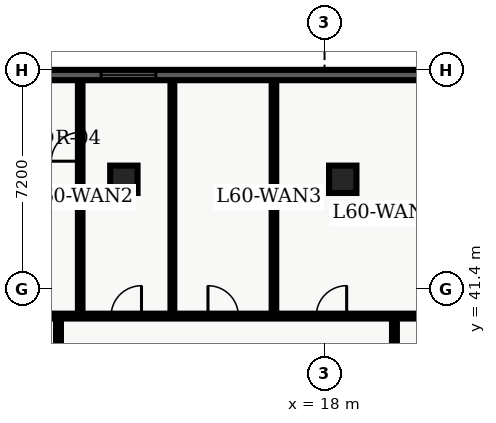
"""IFC4 building model, lengths in metres.
Left out: names, types, materials, properties, quantities, classifications, styles, units other than length and angle.
Written with IfcOpenShell. Run it as: python <this file> out.ifc"""

import sys

from ifc_helpers import new_model, entity, si_unit, converted_unit, direction, frame, origin_with_axes, origin_2d_with_axis, place, context, subcontext, project, spatial, polyline, rectangle, outline, extrude, element, fill, save


model = new_model("IFC4")
c1 = context("Model", 3, precision=1e-05, world=origin_with_axes(), true_north=direction((0.0, 1.0)))
c2 = subcontext(c1, "Body", "Model", "MODEL_VIEW")
j1 = project(units=[si_unit("LENGTHUNIT", "METRE"), converted_unit("PLANEANGLEUNIT", "DEGREE", entity("IfcPlaneAngleMeasure", 0.017), si_unit("PLANEANGLEUNIT", "RADIAN"), dimensions=[0, 0, 0, 0, 0, 0, 0])], contexts=[c1])
p1 = place(None, origin_with_axes())
s1 = spatial("IfcSite", under=j1, at=p1, CompositionType="ELEMENT")
p2 = place(p1, origin_with_axes())
s2 = spatial("IfcBuilding", under=s1, at=p2, CompositionType="ELEMENT")
p3 = place(p2, frame((0.0, 0.0, 244.2), z_axis=(0.0, 0.0, 1.0), x_axis=(1.0, 0.0, 0.0)))
s3 = spatial("IfcBuildingStorey", under=s2, at=p3, CompositionType="ELEMENT", Elevation=244.2)
for number, where, z_axis, x_axis in (
    (1, (11.4, 45.0, 0.0), (0.0, 0.0, 1.0), (1.0, 0.0, 0.0)),
    (2, (18.6, 45.0, 0.0), (0.0, 0.0, 1.0), (1.0, 0.0, 0.0)),
):
    element("IfcColumn", number, at=place(p3, frame(where, z_axis=z_axis, x_axis=x_axis)), inside=s3, PredefinedType="COLUMN", context=c2, shape_type="SweptSolid", body=[
        extrude(rectangle(XDim=0.9, YDim=0.9, at=origin_2d_with_axis()), origin_with_axes(), (0.0, 0.0, 1.0), 3.9),
    ])
p4 = place(p3, frame((7.1, 40.5, 0.0), z_axis=(0.0, 0.0, 1.0), x_axis=(1.0, 0.0, 0.0)))
e3 = element("IfcWall", 3, at=p4, inside=s3, PredefinedType="PARTITIONING", context=c2, shape_type="SweptSolid", body=[
    extrude(outline(polyline([(0.0, -0.08), (24.965, -0.08), (24.965, 0.08), (0.0, 0.08), (0.0, -0.08)])), origin_with_axes(), (0.0, 0.0, 1.0), 2.64),
])
p5 = place(p4, frame((4.38, 0.0, 0.0), z_axis=(0.0, 0.0, 1.0), x_axis=(1.0, 0.0, 0.0)))
e4 = element("IfcOpeningElement", 4, at=p5, cuts=e3, PredefinedType="OPENING", context=c2, shape_type="SweptSolid", body=[
    extrude(rectangle(XDim=1.0, YDim=0.18, at=origin_2d_with_axis()), origin_with_axes(), (0.0, 0.0, 1.0), 2.15),
])
p6 = place(p4, frame((7.566, 0.0, 0.0), z_axis=(0.0, 0.0, 1.0), x_axis=(1.0, 0.0, 0.0)))
e5 = element("IfcOpeningElement", 5, at=p6, cuts=e3, PredefinedType="OPENING", context=c2, shape_type="SweptSolid", body=[
    extrude(rectangle(XDim=1.0, YDim=0.18, at=origin_2d_with_axis()), origin_with_axes(), (0.0, 0.0, 1.0), 2.15),
])
p7 = place(p4, frame((11.129, 0.0, 0.0), z_axis=(0.0, 0.0, 1.0), x_axis=(1.0, 0.0, 0.0)))
e6 = element("IfcOpeningElement", 6, at=p7, cuts=e3, PredefinedType="OPENING", context=c2, shape_type="SweptSolid", body=[
    extrude(rectangle(XDim=1.0, YDim=0.18, at=origin_2d_with_axis()), origin_with_axes(), (0.0, 0.0, 1.0), 2.15),
])
p8 = place(p3, frame((20.3, 7.8, 0.0), z_axis=(0.0, 0.0, 1.0), x_axis=(0.0, 1.0, 0.0)))
e7 = element("IfcWall", 7, at=p8, inside=s3, PredefinedType="PARTITIONING", context=c2, shape_type="SweptSolid", body=[
    extrude(outline(polyline([(0.0, -0.08), (32.7, -0.08), (32.7, 0.08), (0.0, 0.08), (0.0, -0.08)])), origin_with_axes(), (0.0, 0.0, 1.0), 2.64),
])
p9 = place(p8, frame((17.794, 0.0, 0.0), z_axis=(0.0, 0.0, 1.0), x_axis=(1.0, 0.0, 0.0)))
e8 = element("IfcOpeningElement", 8, at=p9, cuts=e7, PredefinedType="OPENING", context=c2, shape_type="SweptSolid", body=[
    extrude(rectangle(XDim=1.0, YDim=0.18, at=origin_2d_with_axis()), origin_with_axes(), (0.0, 0.0, 1.0), 2.15),
])
p10 = place(p8, frame((22.145, 0.0, 0.0), z_axis=(0.0, 0.0, 1.0), x_axis=(1.0, 0.0, 0.0)))
e9 = element("IfcOpeningElement", 9, at=p10, cuts=e7, PredefinedType="OPENING", context=c2, shape_type="SweptSolid", body=[
    extrude(rectangle(XDim=1.0, YDim=0.18, at=origin_2d_with_axis()), origin_with_axes(), (0.0, 0.0, 1.0), 2.15),
])
p11 = place(p8, frame((26.855, 0.0, 0.0), z_axis=(0.0, 0.0, 1.0), x_axis=(1.0, 0.0, 0.0)))
e10 = element("IfcOpeningElement", 10, at=p11, cuts=e7, PredefinedType="OPENING", context=c2, shape_type="SweptSolid", body=[
    extrude(rectangle(XDim=1.0, YDim=0.18, at=origin_2d_with_axis()), origin_with_axes(), (0.0, 0.0, 1.0), 2.15),
])
p12 = place(p8, frame((5.775, 0.0, 0.0), z_axis=(0.0, 0.0, 1.0), x_axis=(1.0, 0.0, 0.0)))
e11 = element("IfcOpeningElement", 11, at=p12, cuts=e7, PredefinedType="OPENING", context=c2, shape_type="SweptSolid", body=[
    extrude(rectangle(XDim=1.05, YDim=0.18, at=origin_2d_with_axis()), origin_with_axes(), (0.0, 0.0, 1.0), 2.15),
])
p13 = place(p3, frame((9.25, 24.4, 0.0), z_axis=(0.0, 0.0, 1.0), x_axis=(0.0, 1.0, 0.0)))
e12 = element("IfcWall", 12, at=p13, inside=s3, PredefinedType="PARTITIONING", context=c2, shape_type="SweptSolid", body=[
    extrude(outline(polyline([(0.0, -0.08), (16.1, -0.08), (16.1, 0.08), (0.0, 0.08), (0.0, -0.08)])), origin_with_axes(), (0.0, 0.0, 1.0), 2.64),
])
p14 = place(p13, frame((2.316, 0.0, 0.0), z_axis=(0.0, 0.0, 1.0), x_axis=(1.0, 0.0, 0.0)))
e13 = element("IfcOpeningElement", 13, at=p14, cuts=e12, PredefinedType="OPENING", context=c2, shape_type="SweptSolid", body=[
    extrude(rectangle(XDim=1.0, YDim=0.18, at=origin_2d_with_axis()), origin_with_axes(), (0.0, 0.0, 1.0), 2.15),
])
p15 = place(p13, frame((7.131, 0.0, 0.0), z_axis=(0.0, 0.0, 1.0), x_axis=(1.0, 0.0, 0.0)))
e14 = element("IfcOpeningElement", 14, at=p15, cuts=e12, PredefinedType="OPENING", context=c2, shape_type="SweptSolid", body=[
    extrude(rectangle(XDim=1.0, YDim=0.18, at=origin_2d_with_axis()), origin_with_axes(), (0.0, 0.0, 1.0), 2.15),
])
p16 = place(p13, frame((12.841, 0.0, 0.0), z_axis=(0.0, 0.0, 1.0), x_axis=(1.0, 0.0, 0.0)))
e15 = element("IfcOpeningElement", 15, at=p16, cuts=e12, PredefinedType="OPENING", context=c2, shape_type="SweptSolid", body=[
    extrude(rectangle(XDim=1.0, YDim=0.18, at=origin_2d_with_axis()), origin_with_axes(), (0.0, 0.0, 1.0), 2.15),
])
p17 = place(p3, frame((9.964, 40.6, 0.0), z_axis=(0.0, 0.0, 1.0), x_axis=(0.0, 1.0, 0.0)))
e16 = element("IfcWall", 16, at=p17, inside=s3, PredefinedType="PARTITIONING", context=c2, shape_type="SweptSolid", body=[
    extrude(outline(polyline([(0.0, -0.075), (7.665, -0.075), (7.665, 0.075), (0.0, 0.075), (0.0, -0.075)])), origin_with_axes(), (0.0, 0.0, 1.0), 2.64),
])
p18 = place(p17, frame((5.47, 0.0, 0.0), z_axis=(0.0, 0.0, 1.0), x_axis=(1.0, 0.0, 0.0)))
e17 = element("IfcOpeningElement", 17, at=p18, cuts=e16, PredefinedType="OPENING", context=c2, shape_type="SweptSolid", body=[
    extrude(rectangle(XDim=0.95, YDim=0.17, at=origin_2d_with_axis()), origin_with_axes(), (0.0, 0.0, 1.0), 2.15),
])
p19 = place(p3, frame((12.996, 40.6, 0.0), z_axis=(0.0, 0.0, 1.0), x_axis=(0.0, 1.0, 0.0)))
e18 = element("IfcWall", 18, at=p19, inside=s3, PredefinedType="PARTITIONING", context=c2, shape_type="SweptSolid", body=[
    extrude(outline(polyline([(0.0, -0.062), (7.665, -0.062), (7.665, 0.062), (0.0, 0.062), (0.0, -0.062)])), origin_with_axes(), (0.0, 0.0, 1.0), 2.64),
])
p20 = place(p3, frame((16.337, 40.6, 0.0), z_axis=(0.0, 0.0, 1.0), x_axis=(0.0, 1.0, 0.0)))
e19 = element("IfcWall", 19, at=p20, inside=s3, PredefinedType="PARTITIONING", context=c2, shape_type="SweptSolid", body=[
    extrude(outline(polyline([(0.0, -0.075), (7.665, -0.075), (7.665, 0.075), (0.0, 0.075), (0.0, -0.075)])), origin_with_axes(), (0.0, 0.0, 1.0), 2.64),
])
p21 = place(p3, frame((7.24, 48.43, 0.0), z_axis=(0.0, 0.0, 1.0), x_axis=(1.0, 0.0, 0.0)))
e20 = element("IfcWall", 20, at=p21, inside=s3, PredefinedType="SOLIDWALL", context=c2, shape_type="SweptSolid", body=[
    extrude(outline(polyline([(0.0, -0.17), (18.36, -0.17), (18.36, 0.17), (0.0, 0.17), (0.0, -0.17)])), origin_with_axes(), (0.0, 0.0, 1.0), 3.6),
])
p22 = place(p21, frame((4.31, 0.0, 0.45), z_axis=(0.0, 0.0, 1.0), x_axis=(1.0, 0.0, 0.0)))
e21 = element("IfcOpeningElement", 21, at=p22, cuts=e20, PredefinedType="OPENING", context=c2, shape_type="SweptSolid", body=[
    extrude(rectangle(XDim=1.8, YDim=0.36, at=origin_2d_with_axis()), origin_with_axes(), (0.0, 0.0, 1.0), 2.1),
])
p23 = place(p21, frame((14.9, 0.0, 0.45), z_axis=(0.0, 0.0, 1.0), x_axis=(1.0, 0.0, 0.0)))
e22 = element("IfcOpeningElement", 22, at=p23, cuts=e20, PredefinedType="OPENING", context=c2, shape_type="SweptSolid", body=[
    extrude(rectangle(XDim=1.8, YDim=0.36, at=origin_2d_with_axis()), origin_with_axes(), (0.0, 0.0, 1.0), 2.1),
])
p24 = place(p17, frame((5.47, 0.0, 0.0), z_axis=(0.0, 0.0, 1.0), x_axis=(1.0, 0.0, 0.0)))
e23 = element("IfcDoor", 23, at=p24, inside=s3, OperationType="SINGLE_SWING_LEFT", PredefinedType="DOOR", context=c2, shape_type="SweptSolid", body=[
    extrude(rectangle(XDim=0.95, YDim=0.09, at=origin_2d_with_axis()), origin_with_axes(), (0.0, 0.0, 1.0), 2.15),
])
fill(e17, e23)
p25 = place(p4, frame((4.38, 0.0, 0.0), z_axis=(0.0, 0.0, 1.0), x_axis=(1.0, 0.0, 0.0)))
e24 = element("IfcDoor", 24, at=p25, inside=s3, OperationType="SINGLE_SWING_RIGHT", PredefinedType="DOOR", context=c2, shape_type="SweptSolid", body=[
    extrude(rectangle(XDim=1.0, YDim=0.09, at=origin_2d_with_axis()), origin_with_axes(), (0.0, 0.0, 1.0), 2.15),
])
fill(e4, e24)
p26 = place(p4, frame((7.566, 0.0, 0.0), z_axis=(0.0, 0.0, 1.0), x_axis=(1.0, 0.0, 0.0)))
e25 = element("IfcDoor", 25, at=p26, inside=s3, OperationType="SINGLE_SWING_LEFT", PredefinedType="DOOR", context=c2, shape_type="SweptSolid", body=[
    extrude(rectangle(XDim=1.0, YDim=0.09, at=origin_2d_with_axis()), origin_with_axes(), (0.0, 0.0, 1.0), 2.15),
])
fill(e5, e25)
p27 = place(p4, frame((11.129, 0.0, 0.0), z_axis=(0.0, 0.0, 1.0), x_axis=(1.0, 0.0, 0.0)))
e26 = element("IfcDoor", 26, at=p27, inside=s3, OperationType="SINGLE_SWING_RIGHT", PredefinedType="DOOR", context=c2, shape_type="SweptSolid", body=[
    extrude(rectangle(XDim=1.0, YDim=0.09, at=origin_2d_with_axis()), origin_with_axes(), (0.0, 0.0, 1.0), 2.15),
])
fill(e6, e26)
p28 = place(p21, frame((4.31, 0.0, 0.45), z_axis=(0.0, 0.0, 1.0), x_axis=(1.0, 0.0, 0.0)))
e27 = element("IfcWindow", 27, at=p28, inside=s3, PredefinedType="WINDOW", context=c2, shape_type="SweptSolid", body=[
    extrude(rectangle(XDim=1.8, YDim=0.09, at=origin_2d_with_axis()), origin_with_axes(), (0.0, 0.0, 1.0), 2.1),
])
fill(e21, e27)
save(model, sys.argv[1])
